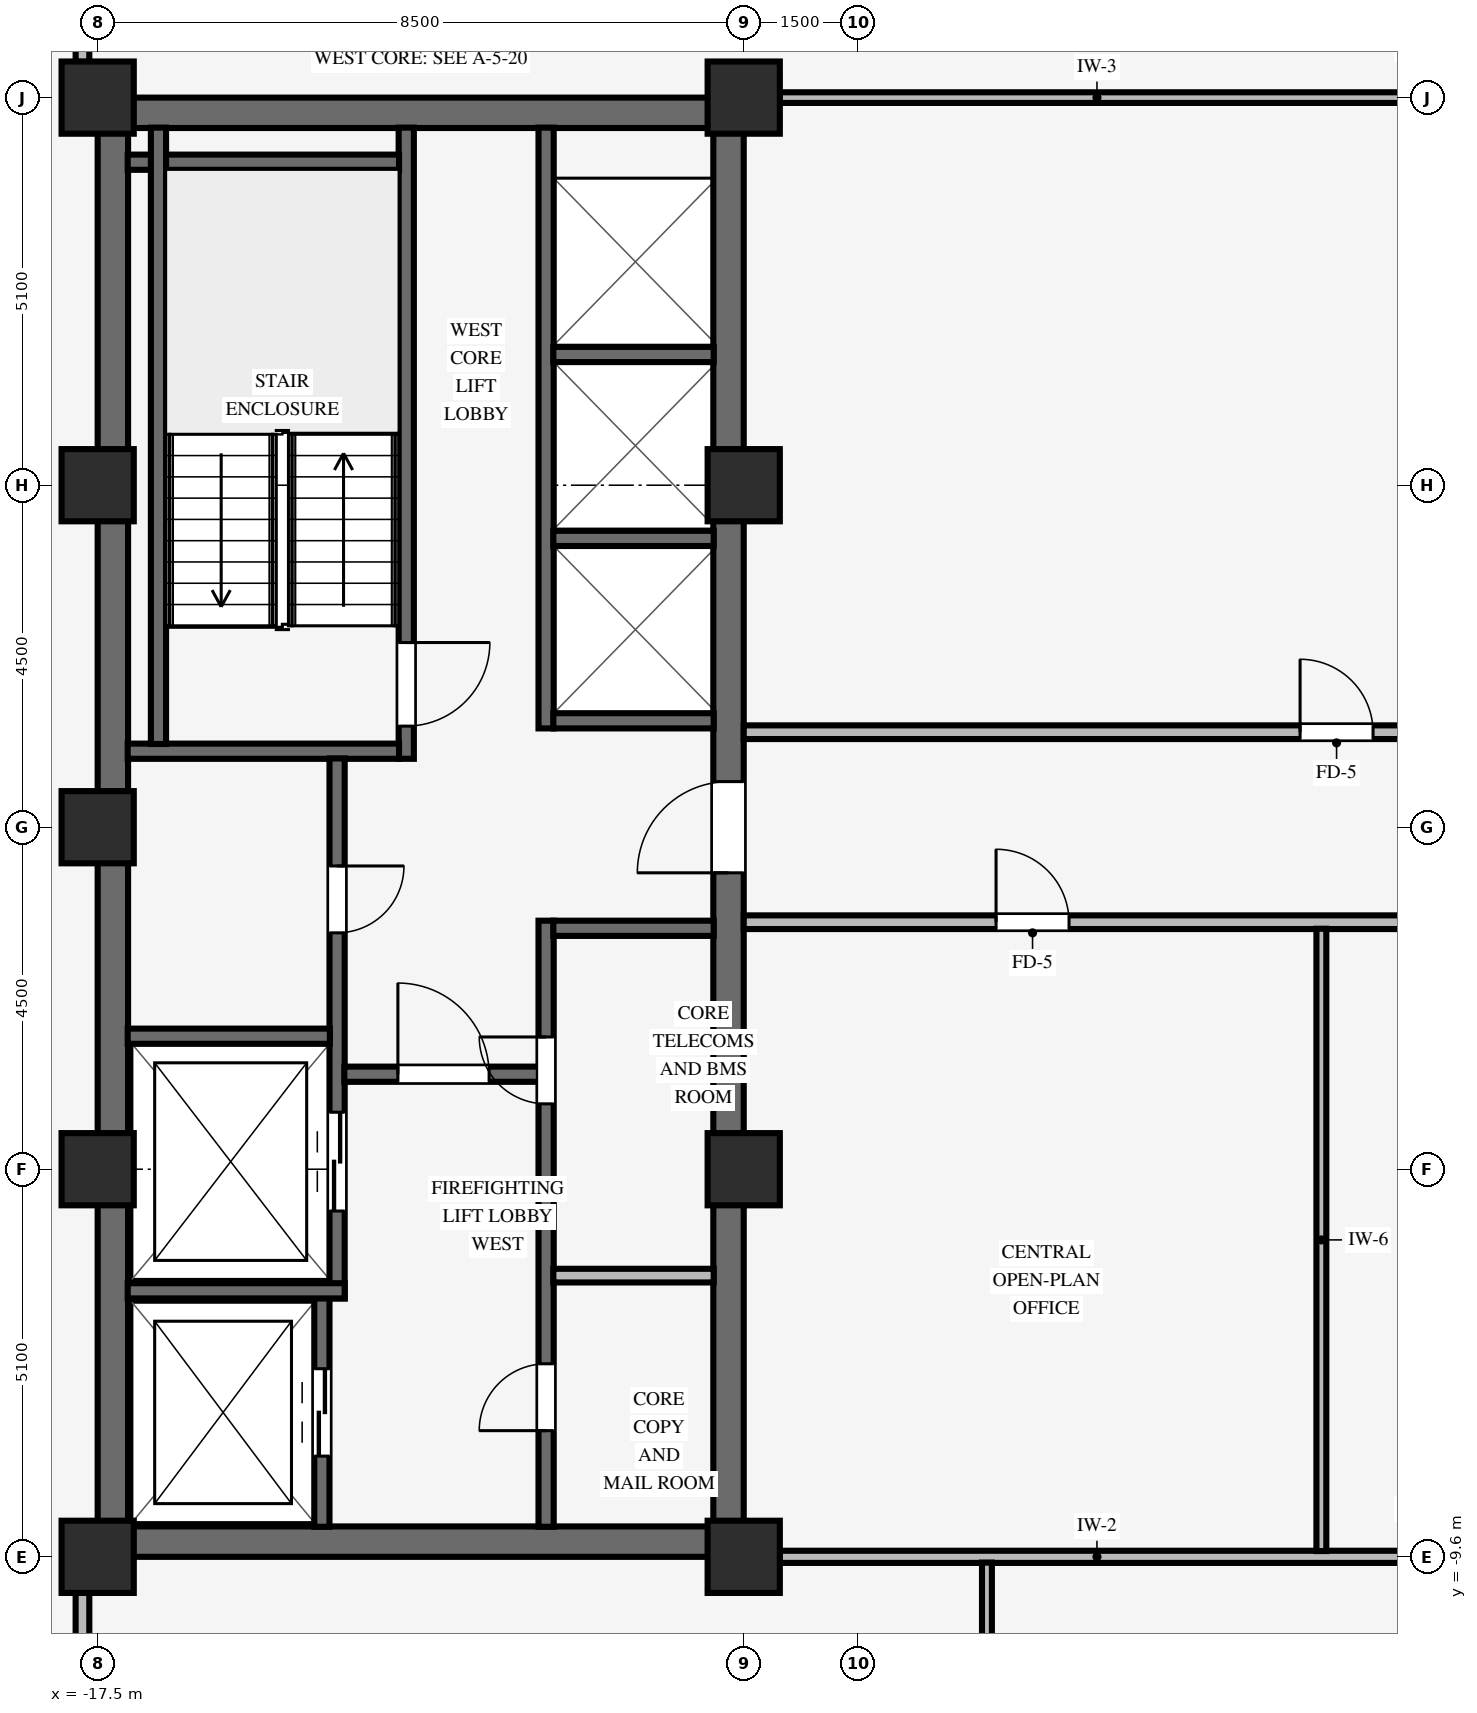
"""IFC4 building model, lengths in metres.
Left out: names, types, materials, properties, quantities, classifications, styles, units other than length and angle.
Written with IfcOpenShell. Run it as: python <this file> out.ifc"""

import sys

from ifc_helpers import new_model, si_unit, direction, frame, frame_2d, origin, origin_2d, place, context, subcontext, project, spatial, rectangle, extrude, source, transform, mapped, element, fill, save


model = new_model("IFC4")
c1 = context("Model", 3, precision=1e-05, world=origin(), true_north=direction((0.0, 1.0)))
c2 = subcontext(c1, "Body", "Model", "MODEL_VIEW")
j1 = project(units=[si_unit("LENGTHUNIT", "METRE"), si_unit("PLANEANGLEUNIT", "RADIAN")], contexts=[c1])
p1 = place(None, origin())
s1 = spatial("IfcSite", under=j1, at=p1, CompositionType="ELEMENT")
p2 = place(p1, origin())
s2 = spatial("IfcBuilding", under=s1, at=p2, CompositionType="ELEMENT")
p3 = place(p2, frame((0.0, 0.0, 153.05)))
s3 = spatial("IfcBuildingStorey", under=s2, at=p3, CompositionType="ELEMENT", Elevation=153.05)
for number, where, z_axis, x_axis in (
    (1, (-17.5, -9.4, 0.0), (0.0, 0.0, 1.0), (1.0, 0.0, 0.0)),
    (2, (-17.5, 9.4, 0.0), (0.0, 0.0, 1.0), (1.0, 0.0, 0.0)),
):
    element("IfcWall", number, at=place(p3, frame(where, z_axis=z_axis, x_axis=x_axis)), inside=s3, PredefinedType="SHEAR", context=c2, shape_type="SweptSolid", body=[
        extrude(rectangle(XDim=8.5, YDim=0.4, at=frame_2d((4.25, 0.0))), origin(), (0.0, 0.0, 1.0), 3.37),
    ])
p4 = place(p3, frame((-17.3, -9.205, 0.0), z_axis=(0.0, 0.0, 1.0), x_axis=(0.0, 1.0, 0.0)))
e3 = element("IfcWall", 3, at=p4, inside=s3, PredefinedType="SHEAR", context=c2, shape_type="SweptSolid", body=[
    extrude(rectangle(XDim=18.41, YDim=0.4, at=frame_2d((9.205, 0.0))), origin(), (0.0, 0.0, 1.0), 3.37),
])
p5 = place(p3, frame((-9.2, -9.205, 0.0), z_axis=(0.0, 0.0, 1.0), x_axis=(0.0, 1.0, 0.0)))
e4 = element("IfcWall", 4, at=p5, inside=s3, PredefinedType="SHEAR", context=c2, shape_type="SweptSolid", body=[
    extrude(rectangle(XDim=18.41, YDim=0.4, at=frame_2d((9.205, 0.0))), origin(), (0.0, 0.0, 1.0), 3.37),
])
p6 = place(p5, frame((8.605, 0.0, 0.0)))
e5 = element("IfcOpeningElement", 5, at=p6, cuts=e4, PredefinedType="OPENING", context=c2, shape_type="SweptSolid", body=[
    extrude(rectangle(XDim=1.2, YDim=2.15, at=frame_2d((0.6, 1.075))), frame((0.0, 0.21, 0.0), z_axis=(0.0, -1.0, 0.0), x_axis=(1.0, 0.0, 0.0)), (0.0, 0.0, 1.0), 0.42),
])
for number, where, z_axis, x_axis in (
    (6, (-17.5, -9.6, 0.0), (0.0, 0.0, 1.0), (1.0, 0.0, 0.0)),
    (7, (-17.5, -4.5, 0.0), (0.0, 0.0, 1.0), (1.0, 0.0, 0.0)),
    (8, (-17.5, 4.5, 0.0), (0.0, 0.0, 1.0), (1.0, 0.0, 0.0)),
    (9, (-17.5, 9.6, 0.0), (0.0, 0.0, 1.0), (1.0, 0.0, 0.0)),
    (10, (-9.0, -9.6, 0.0), (0.0, 0.0, 1.0), (1.0, 0.0, 0.0)),
    (11, (-9.0, -4.5, 0.0), (0.0, 0.0, 1.0), (1.0, 0.0, 0.0)),
    (12, (-9.0, 4.5, 0.0), (0.0, 0.0, 1.0), (1.0, 0.0, 0.0)),
    (13, (-9.0, 9.6, 0.0), (0.0, 0.0, 1.0), (1.0, 0.0, 0.0)),
    (14, (-17.5, 0.0, 0.0), (0.0, 0.0, 1.0), (1.0, 0.0, 0.0)),
):
    element("IfcColumn", number, at=place(p3, frame(where, z_axis=z_axis, x_axis=x_axis)), inside=s3, PredefinedType="COLUMN", context=c2, shape_type="SweptSolid", body=[
        extrude(rectangle(XDim=0.95, YDim=0.95, at=origin_2d()), origin(), (0.0, 0.0, 1.0), 3.37),
    ])
p7 = place(p3, frame((-13.44, 0.9, 0.0), z_axis=(0.0, 0.0, 1.0), x_axis=(0.0, 1.0, 0.0)))
e15 = element("IfcWall", 15, at=p7, inside=s3, PredefinedType="SHEAR", context=c2, shape_type="SweptSolid", body=[
    extrude(rectangle(XDim=8.305, YDim=0.2, at=frame_2d((4.153, 0.0))), origin(), (0.0, 0.0, 1.0), 3.37),
])
p8 = place(p7, frame((1.53, 0.0, 0.0), z_axis=(0.0, 0.0, 1.0), x_axis=(-1.0, 0.0, 0.0)))
e16 = element("IfcOpeningElement", 16, at=p8, cuts=e15, PredefinedType="OPENING", context=c2, shape_type="SweptSolid", body=[
    extrude(rectangle(XDim=1.1, YDim=2.15, at=frame_2d((0.55, 1.075))), frame((0.0, 0.11, 0.0), z_axis=(0.0, -1.0, 0.0), x_axis=(1.0, 0.0, 0.0)), (0.0, 0.0, 1.0), 0.22),
])
for number, where, z_axis, x_axis in (
    (17, (-17.105, 1.0, 0.0), (0.0, 0.0, 1.0), (1.0, 0.0, 0.0)),
    (18, (-17.105, 8.75, 0.0), (0.0, 0.0, 1.0), (1.0, 0.0, 0.0)),
):
    element("IfcWall", number, at=place(p3, frame(where, z_axis=z_axis, x_axis=x_axis)), inside=s3, PredefinedType="SHEAR", context=c2, shape_type="SweptSolid", body=[
        extrude(rectangle(XDim=3.57, YDim=0.2, at=frame_2d((1.785, 0.0))), origin(), (0.0, 0.0, 1.0), 3.37),
    ])
p9 = place(p3, frame((-16.7, 1.095, 0.0), z_axis=(0.0, 0.0, 1.0), x_axis=(0.0, 1.0, 0.0)))
e19 = element("IfcWall", 19, at=p9, inside=s3, PredefinedType="SHEAR", context=c2, shape_type="SweptSolid", body=[
    extrude(rectangle(XDim=8.11, YDim=0.2, at=frame_2d((4.055, 0.0))), origin(), (0.0, 0.0, 1.0), 3.37),
])
p10 = place(p3, frame((-14.55, -9.205, 0.0), z_axis=(0.0, 0.0, 1.0), x_axis=(0.0, 1.0, 0.0)))
e20 = element("IfcWall", 20, at=p10, inside=s3, PredefinedType="SHEAR", context=c2, shape_type="SweptSolid", body=[
    extrude(rectangle(XDim=3.01, YDim=0.2, at=frame_2d((1.505, 0.0))), origin(), (0.0, 0.0, 1.0), 3.37),
])
p11 = place(p10, frame((0.93, 0.0, 0.0)))
e21 = element("IfcOpeningElement", 21, at=p11, cuts=e20, PredefinedType="OPENING", context=c2, shape_type="SweptSolid", body=[
    extrude(rectangle(XDim=1.15, YDim=2.15, at=frame_2d((0.575, 1.075))), frame((0.0, 0.11, 0.0), z_axis=(0.0, -1.0, 0.0), x_axis=(1.0, 0.0, 0.0)), (0.0, 0.0, 1.0), 0.22),
])
p12 = place(p3, frame((-14.35, -6.2, 0.0), z_axis=(0.0, 0.0, 1.0), x_axis=(0.0, 1.0, 0.0)))
e22 = element("IfcWall", 22, at=p12, inside=s3, PredefinedType="SHEAR", context=c2, shape_type="SweptSolid", body=[
    extrude(rectangle(XDim=7.105, YDim=0.2, at=frame_2d((3.552, 0.0))), origin(), (0.0, 0.0, 1.0), 3.37),
])
p13 = place(p12, frame((5.69, 0.0, 0.0), z_axis=(0.0, 0.0, 1.0), x_axis=(-1.0, 0.0, 0.0)))
e23 = element("IfcOpeningElement", 23, at=p13, cuts=e22, PredefinedType="OPENING", context=c2, shape_type="SweptSolid", body=[
    extrude(rectangle(XDim=0.88, YDim=2.1, at=frame_2d((0.44, 1.05))), frame((0.0, 0.11, 0.0), z_axis=(0.0, -1.0, 0.0), x_axis=(1.0, 0.0, 0.0)), (0.0, 0.0, 1.0), 0.22),
])
p14 = place(p12, frame((1.15, 0.0, 0.0)))
e24 = element("IfcOpeningElement", 24, at=p14, cuts=e22, PredefinedType="OPENING", context=c2, shape_type="SweptSolid", body=[
    extrude(rectangle(XDim=1.3, YDim=2.2, at=frame_2d((0.65, 1.1))), frame((0.0, 0.11, 0.0), z_axis=(0.0, -1.0, 0.0), x_axis=(1.0, 0.0, 0.0)), (0.0, 0.0, 1.0), 0.22),
])
p15 = place(p3, frame((-17.105, -6.1, 0.0), z_axis=(0.0, 0.0, 1.0), x_axis=(1.0, 0.0, 0.0)))
e25 = element("IfcWall", 25, at=p15, inside=s3, PredefinedType="SHEAR", context=c2, shape_type="SweptSolid", body=[
    extrude(rectangle(XDim=2.855, YDim=0.2, at=frame_2d((1.427, 0.0))), origin(), (0.0, 0.0, 1.0), 3.37),
])
p16 = place(p3, frame((-17.105, -2.75, 0.0), z_axis=(0.0, 0.0, 1.0), x_axis=(1.0, 0.0, 0.0)))
e26 = element("IfcWall", 26, at=p16, inside=s3, PredefinedType="SHEAR", context=c2, shape_type="SweptSolid", body=[
    extrude(rectangle(XDim=2.66, YDim=0.2, at=frame_2d((1.33, 0.0))), origin(), (0.0, 0.0, 1.0), 3.37),
])
p17 = place(p3, frame((-11.6, -9.205, 0.0), z_axis=(0.0, 0.0, 1.0), x_axis=(0.0, 1.0, 0.0)))
e27 = element("IfcWall", 27, at=p17, inside=s3, PredefinedType="SHEAR", context=c2, shape_type="SweptSolid", body=[
    extrude(rectangle(XDim=7.975, YDim=0.2, at=frame_2d((3.988, 0.0))), origin(), (0.0, 0.0, 1.0), 3.37),
])
p18 = place(p17, frame((1.265, 0.0, 0.0)))
e28 = element("IfcOpeningElement", 28, at=p18, cuts=e27, PredefinedType="OPENING", context=c2, shape_type="SweptSolid", body=[
    extrude(rectangle(XDim=0.88, YDim=2.1, at=frame_2d((0.44, 1.05))), frame((0.0, 0.11, 0.0), z_axis=(0.0, -1.0, 0.0), x_axis=(1.0, 0.0, 0.0)), (0.0, 0.0, 1.0), 0.22),
])
p19 = place(p17, frame((5.565, 0.0, 0.0)))
e29 = element("IfcOpeningElement", 29, at=p19, cuts=e27, PredefinedType="OPENING", context=c2, shape_type="SweptSolid", body=[
    extrude(rectangle(XDim=0.88, YDim=2.1, at=frame_2d((0.44, 1.05))), frame((0.0, 0.11, 0.0), z_axis=(0.0, -1.0, 0.0), x_axis=(1.0, 0.0, 0.0)), (0.0, 0.0, 1.0), 0.22),
])
p20 = place(p3, frame((-14.255, -3.25, 0.0), z_axis=(0.0, 0.0, 1.0), x_axis=(1.0, 0.0, 0.0)))
e30 = element("IfcWall", 30, at=p20, inside=s3, PredefinedType="SHEAR", context=c2, shape_type="SweptSolid", body=[
    extrude(rectangle(XDim=2.56, YDim=0.2, at=frame_2d((1.28, 0.0))), origin(), (0.0, 0.0, 1.0), 3.37),
])
p21 = place(p20, frame((0.705, 0.0, 0.0)))
e31 = element("IfcOpeningElement", 31, at=p21, cuts=e30, PredefinedType="OPENING", context=c2, shape_type="SweptSolid", body=[
    extrude(rectangle(XDim=1.2, YDim=2.15, at=frame_2d((0.6, 1.075))), frame((0.0, 0.11, 0.0), z_axis=(0.0, -1.0, 0.0), x_axis=(1.0, 0.0, 0.0)), (0.0, 0.0, 1.0), 0.22),
])
p22 = place(p3, frame((-11.505, -1.33, 0.0), z_axis=(0.0, 0.0, 1.0), x_axis=(1.0, 0.0, 0.0)))
e32 = element("IfcWall", 32, at=p22, inside=s3, PredefinedType="SHEAR", context=c2, shape_type="SweptSolid", body=[
    extrude(rectangle(XDim=2.11, YDim=0.2, at=frame_2d((1.055, 0.0))), origin(), (0.0, 0.0, 1.0), 3.37),
])
p23 = place(p3, frame((-11.505, -5.9, 0.0), z_axis=(0.0, 0.0, 1.0), x_axis=(1.0, 0.0, 0.0)))
e33 = element("IfcWall", 33, at=p23, inside=s3, PredefinedType="PARTITIONING", context=c2, shape_type="SweptSolid", body=[
    extrude(rectangle(XDim=2.11, YDim=0.18, at=frame_2d((1.055, 0.0))), origin(), (0.0, 0.0, 1.0), 3.36),
])
p24 = place(p3, frame((-11.6, 1.3, 0.0), z_axis=(0.0, 0.0, 1.0), x_axis=(0.0, 1.0, 0.0)))
e34 = element("IfcWall", 34, at=p24, inside=s3, PredefinedType="SHEAR", context=c2, shape_type="SweptSolid", body=[
    extrude(rectangle(XDim=7.905, YDim=0.2, at=frame_2d((3.953, 0.0))), origin(), (0.0, 0.0, 1.0), 3.37),
])
for number, where, z_axis, x_axis in (
    (35, (-11.505, 1.4, 0.0), (0.0, 0.0, 1.0), (1.0, 0.0, 0.0)),
    (36, (-11.505, 3.8, 0.0), (0.0, 0.0, 1.0), (1.0, 0.0, 0.0)),
    (37, (-11.505, 6.22, 0.0), (0.0, 0.0, 1.0), (1.0, 0.0, 0.0)),
):
    element("IfcWall", number, at=place(p3, frame(where, z_axis=z_axis, x_axis=x_axis)), inside=s3, PredefinedType="SHEAR", context=c2, shape_type="SweptSolid", body=[
        extrude(rectangle(XDim=2.11, YDim=0.2, at=frame_2d((1.055, 0.0))), origin(), (0.0, 0.0, 1.0), 3.37),
    ])
p25 = place(p3, frame((-8.529, -9.6, 0.0), z_axis=(0.0, 0.0, 1.0), x_axis=(1.0, 0.0, 0.0)))
e38 = element("IfcWall", 38, at=p25, inside=s3, PredefinedType="PARTITIONING", context=c2, shape_type="SweptSolid", body=[
    extrude(rectangle(XDim=8.353, YDim=0.16, at=frame_2d((4.177, 0.0))), origin(), (0.0, 0.0, 1.0), 2.405),
])
p26 = place(p3, frame((-9.0, -1.25, 0.0), z_axis=(0.0, 0.0, 1.0), x_axis=(1.0, 0.0, 0.0)))
e39 = element("IfcWall", 39, at=p26, inside=s3, PredefinedType="PARTITIONING", context=c2, shape_type="SweptSolid", body=[
    extrude(rectangle(XDim=15.6, YDim=0.18, at=frame_2d((7.8, 0.0))), origin(), (0.0, 0.0, 1.0), 3.36),
])
p27 = place(p26, frame((3.32, 0.0, 0.0)))
e40 = element("IfcOpeningElement", 40, at=p27, cuts=e39, PredefinedType="OPENING", context=c2, shape_type="SweptSolid", body=[
    extrude(rectangle(XDim=0.96, YDim=2.1, at=frame_2d((0.48, 1.05))), frame((0.0, 0.1, 0.0), z_axis=(0.0, -1.0, 0.0), x_axis=(1.0, 0.0, 0.0)), (0.0, 0.0, 1.0), 0.2),
])
p28 = place(p3, frame((-9.0, 1.25, 0.0), z_axis=(0.0, 0.0, 1.0), x_axis=(1.0, 0.0, 0.0)))
e41 = element("IfcWall", 41, at=p28, inside=s3, PredefinedType="PARTITIONING", context=c2, shape_type="SweptSolid", body=[
    extrude(rectangle(XDim=15.6, YDim=0.18, at=frame_2d((7.8, 0.0))), origin(), (0.0, 0.0, 1.0), 3.36),
])
p29 = place(p28, frame((7.32, 0.0, 0.0)))
e42 = element("IfcOpeningElement", 42, at=p29, cuts=e41, PredefinedType="OPENING", context=c2, shape_type="SweptSolid", body=[
    extrude(rectangle(XDim=0.96, YDim=2.1, at=frame_2d((0.48, 1.05))), frame((0.0, 0.1, 0.0), z_axis=(0.0, -1.0, 0.0), x_axis=(1.0, 0.0, 0.0)), (0.0, 0.0, 1.0), 0.2),
])
p30 = place(p3, frame((-8.529, 9.6, 0.0), z_axis=(0.0, 0.0, 1.0), x_axis=(1.0, 0.0, 0.0)))
e43 = element("IfcWall", 43, at=p30, inside=s3, PredefinedType="PARTITIONING", context=c2, shape_type="SweptSolid", body=[
    extrude(rectangle(XDim=8.353, YDim=0.14, at=frame_2d((4.177, 0.0))), origin(), (0.0, 0.0, 1.0), 2.405),
])
for number, where, z_axis, x_axis in (
    (44, (-17.7, -13.414, 0.0), (0.0, 0.0, 1.0), (0.0, 1.0, 0.0)),
    (45, (-17.7, 10.071, 0.0), (0.0, 0.0, 1.0), (0.0, 1.0, 0.0)),
):
    element("IfcWall", number, at=place(p3, frame(where, z_axis=z_axis, x_axis=x_axis)), inside=s3, PredefinedType="PARTITIONING", context=c2, shape_type="SweptSolid", body=[
        extrude(rectangle(XDim=3.343, YDim=0.18, at=frame_2d((1.671, 0.0))), origin(), (0.0, 0.0, 1.0), 2.816),
    ])
p31 = place(p3, frame((-5.8, -13.414, 0.0), z_axis=(0.0, 0.0, 1.0), x_axis=(0.0, 1.0, 0.0)))
e46 = element("IfcWall", 46, at=p31, inside=s3, PredefinedType="PARTITIONING", context=c2, shape_type="SweptSolid", body=[
    extrude(rectangle(XDim=3.738, YDim=0.13, at=frame_2d((1.869, 0.0))), origin(), (0.0, 0.0, 1.0), 3.36),
])
p32 = place(p3, frame((-1.4, -9.524, 0.0), z_axis=(0.0, 0.0, 1.0), x_axis=(0.0, 1.0, 0.0)))
e47 = element("IfcWall", 47, at=p32, inside=s3, PredefinedType="PARTITIONING", context=c2, shape_type="SweptSolid", body=[
    extrude(rectangle(XDim=8.188, YDim=0.13, at=frame_2d((4.094, 0.0))), origin(), (0.0, 0.0, 1.0), 3.36),
])
m1 = source(origin(), c2, "Body", "SweptSolid", [
    extrude(rectangle(XDim=1.1, YDim=2.15, at=frame_2d((0.55, 1.075))), frame((0.0, 0.025, 0.0), z_axis=(0.0, -1.0, 0.0), x_axis=(1.0, 0.0, 0.0)), (0.0, 0.0, 1.0), 0.05),
])
p33 = place(p8, origin())
e48 = element("IfcDoor", 48, at=p33, inside=s3, OperationType="SINGLE_SWING_LEFT", PredefinedType="DOOR", context=c2, shape_type="MappedRepresentation", body=[
    mapped(m1, transform((0.0, 0.0, 0.0), scale=1.0)),
])
fill(e16, e48)
m2 = source(origin(), c2, "Body", "SweptSolid", [
    extrude(rectangle(XDim=0.88, YDim=2.1, at=frame_2d((0.44, 1.05))), frame((0.0, 0.025, 0.0), z_axis=(0.0, -1.0, 0.0), x_axis=(1.0, 0.0, 0.0)), (0.0, 0.0, 1.0), 0.05),
])
p34 = place(p13, origin())
e49 = element("IfcDoor", 49, at=p34, inside=s3, OperationType="SINGLE_SWING_LEFT", PredefinedType="DOOR", context=c2, shape_type="MappedRepresentation", body=[
    mapped(m2, transform((0.0, 0.0, 0.0), scale=1.0)),
])
fill(e23, e49)
m3 = source(origin(), c2, "Body", "SweptSolid", [
    extrude(rectangle(XDim=1.2, YDim=2.15, at=frame_2d((0.6, 1.075))), frame((0.0, 0.025, 0.0), z_axis=(0.0, -1.0, 0.0), x_axis=(1.0, 0.0, 0.0)), (0.0, 0.0, 1.0), 0.05),
])
p35 = place(p21, origin())
e50 = element("IfcDoor", 50, at=p35, inside=s3, OperationType="SINGLE_SWING_LEFT", PredefinedType="DOOR", context=c2, shape_type="MappedRepresentation", body=[
    mapped(m3, transform((0.0, 0.0, 0.0), scale=1.0)),
])
fill(e31, e50)
p36 = place(p18, origin())
e51 = element("IfcDoor", 51, at=p36, inside=s3, OperationType="SINGLE_SWING_LEFT", PredefinedType="DOOR", context=c2, shape_type="MappedRepresentation", body=[
    mapped(m2, transform((0.0, 0.0, 0.0), scale=1.0)),
])
fill(e28, e51)
p37 = place(p19, origin())
e52 = element("IfcDoor", 52, at=p37, inside=s3, OperationType="SINGLE_SWING_RIGHT", PredefinedType="DOOR", context=c2, shape_type="MappedRepresentation", body=[
    mapped(m2, transform((0.0, 0.0, 0.0), scale=1.0)),
])
fill(e29, e52)
p38 = place(p6, origin())
e53 = element("IfcDoor", 53, at=p38, inside=s3, OperationType="SINGLE_SWING_LEFT", PredefinedType="DOOR", context=c2, shape_type="MappedRepresentation", body=[
    mapped(m3, transform((0.0, 0.0, 0.0), scale=1.0)),
])
fill(e5, e53)
m4 = source(origin(), c2, "Body", "SweptSolid", [
    extrude(rectangle(XDim=1.15, YDim=2.15, at=frame_2d((0.575, 1.075))), frame((0.0, 0.025, 0.0), z_axis=(0.0, -1.0, 0.0), x_axis=(1.0, 0.0, 0.0)), (0.0, 0.0, 1.0), 0.05),
])
p39 = place(p11, origin())
e54 = element("IfcDoor", 54, at=p39, inside=s3, OperationType="DOUBLE_DOOR_SLIDING", PredefinedType="DOOR", context=c2, shape_type="MappedRepresentation", body=[
    mapped(m4, transform((0.0, 0.0, 0.0), scale=1.0)),
])
fill(e21, e54)
m5 = source(origin(), c2, "Body", "SweptSolid", [
    extrude(rectangle(XDim=1.3, YDim=2.2, at=frame_2d((0.65, 1.1))), frame((0.0, 0.025, 0.0), z_axis=(0.0, -1.0, 0.0), x_axis=(1.0, 0.0, 0.0)), (0.0, 0.0, 1.0), 0.05),
])
p40 = place(p14, origin())
e55 = element("IfcDoor", 55, at=p40, inside=s3, OperationType="DOUBLE_DOOR_SLIDING", PredefinedType="DOOR", context=c2, shape_type="MappedRepresentation", body=[
    mapped(m5, transform((0.0, 0.0, 0.0), scale=1.0)),
])
fill(e24, e55)
m6 = source(origin(), c2, "Body", "SweptSolid", [
    extrude(rectangle(XDim=0.96, YDim=2.1, at=frame_2d((0.48, 1.05))), frame((0.0, 0.025, 0.0), z_axis=(0.0, -1.0, 0.0), x_axis=(1.0, 0.0, 0.0)), (0.0, 0.0, 1.0), 0.05),
])
p41 = place(p29, origin())
e56 = element("IfcDoor", 56, at=p41, inside=s3, OperationType="SINGLE_SWING_LEFT", PredefinedType="DOOR", context=c2, shape_type="MappedRepresentation", body=[
    mapped(m6, transform((0.0, 0.0, 0.0), scale=1.0)),
])
fill(e42, e56)
p42 = place(p27, origin())
e57 = element("IfcDoor", 57, at=p42, inside=s3, OperationType="SINGLE_SWING_LEFT", PredefinedType="DOOR", context=c2, shape_type="MappedRepresentation", body=[
    mapped(m6, transform((0.0, 0.0, 0.0), scale=1.0)),
])
fill(e40, e57)
save(model, sys.argv[1])
